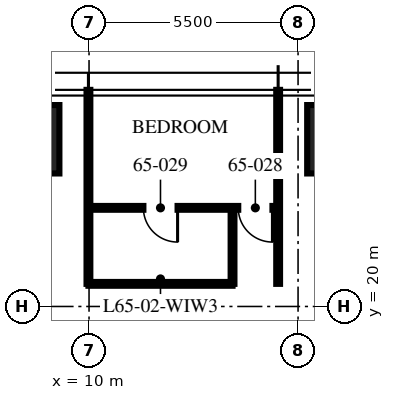
"""IFC4 building model, lengths in metres.
Left out: names, types, materials, properties, quantities, classifications, styles, units other than length and angle.
Written with IfcOpenShell. Run it as: python <this file> out.ifc"""

import sys

from ifc_helpers import new_model, si_unit, direction, frame, frame_2d, origin, origin_2d, place, context, subcontext, project, spatial, rectangle, extrude, element, fill, save


model = new_model("IFC4")
c1 = context("Model", 3, precision=1e-05, world=origin(), true_north=direction((0.0, 1.0)))
c2 = subcontext(c1, "Body", "Model", "MODEL_VIEW")
j1 = project(units=[si_unit("LENGTHUNIT", "METRE"), si_unit("PLANEANGLEUNIT", "RADIAN")], contexts=[c1])
p1 = place(None, origin())
s1 = spatial("IfcSite", under=j1, at=p1, CompositionType="ELEMENT")
p2 = place(p1, origin())
s2 = spatial("IfcBuilding", under=s1, at=p2, CompositionType="ELEMENT")
p3 = place(p2, frame((0.0, 0.0, 259.5)))
s3 = spatial("IfcBuildingStorey", under=s2, at=p3, CompositionType="ELEMENT", Elevation=259.5)
for number, where, z_axis, x_axis in (
    (1, (8.32, 24.4, 0.0), (0.0, 0.0, 1.0), (1.0, 0.0, 0.0)),
    (2, (16.64, 24.4, 0.0), (0.0, 0.0, 1.0), (1.0, 0.0, 0.0)),
):
    element("IfcColumn", number, at=place(p3, frame(where, z_axis=z_axis, x_axis=x_axis)), inside=s3, PredefinedType="COLUMN", context=c2, shape_type="SweptSolid", body=[
        extrude(rectangle(XDim=1.8, YDim=1.8, at=origin_2d()), origin(), (0.0, 0.0, 1.0), 3.75),
    ])
for number, where, z_axis, x_axis in (
    (3, (14.976, 20.595, 0.0), (0.0, 0.0, 1.0), (0.0, 1.0, 0.0)),
    (4, (9.984, 20.595, 0.0), (0.0, 0.0, 1.0), (0.0, 1.0, 0.0)),
):
    element("IfcWall", number, at=place(p3, frame(where, z_axis=z_axis, x_axis=x_axis)), inside=s3, PredefinedType="PARTITIONING", context=c2, shape_type="SweptSolid", body=[
        extrude(rectangle(XDim=5.105, YDim=0.1, at=frame_2d((2.552, 0.0))), origin(), (0.0, 0.0, 1.0), 2.91),
    ])
p4 = place(p3, frame((14.976, 22.595, 0.0), z_axis=(0.0, 0.0, 1.0), x_axis=(-1.0, 0.0, 0.0)))
e5 = element("IfcWall", 5, at=p4, inside=s3, PredefinedType="PARTITIONING", context=c2, shape_type="SweptSolid", body=[
    extrude(rectangle(XDim=4.992, YDim=0.1, at=frame_2d((2.496, 0.0))), origin(), (0.0, 0.0, 1.0), 2.81),
])
p5 = place(p4, frame((0.15, 0.0, 0.0)))
e6 = element("IfcOpeningElement", 6, at=p5, cuts=e5, PredefinedType="OPENING", context=c2, shape_type="SweptSolid", body=[
    extrude(rectangle(XDim=0.9, YDim=2.1, at=frame_2d((0.45, 1.05))), frame((0.0, 0.06, 0.0), z_axis=(0.0, -1.0, 0.0), x_axis=(1.0, 0.0, 0.0)), (0.0, 0.0, 1.0), 0.12),
])
p6 = place(p4, frame((2.646, 0.0, 0.0)))
e7 = element("IfcOpeningElement", 7, at=p6, cuts=e5, PredefinedType="OPENING", context=c2, shape_type="SweptSolid", body=[
    extrude(rectangle(XDim=0.9, YDim=2.1, at=frame_2d((0.45, 1.05))), frame((0.0, 0.06, 0.0), z_axis=(0.0, -1.0, 0.0), x_axis=(1.0, 0.0, 0.0)), (0.0, 0.0, 1.0), 0.12),
])
p7 = place(p3, frame((13.776, 20.595, 0.0), z_axis=(0.0, 0.0, 1.0), x_axis=(0.0, 1.0, 0.0)))
e8 = element("IfcWall", 8, at=p7, inside=s3, PredefinedType="PARTITIONING", context=c2, shape_type="SweptSolid", body=[
    extrude(rectangle(XDim=2.0, YDim=0.1, at=frame_2d((1.0, 0.0))), origin(), (0.0, 0.0, 1.0), 3.5),
])
p8 = place(p3, frame((13.776, 20.595, 0.0), z_axis=(0.0, 0.0, 1.0), x_axis=(-1.0, 0.0, 0.0)))
e9 = element("IfcWall", 9, at=p8, inside=s3, PredefinedType="PARTITIONING", context=c2, shape_type="SweptSolid", body=[
    extrude(rectangle(XDim=3.792, YDim=0.1, at=frame_2d((1.896, 0.0))), origin(), (0.0, 0.0, 1.0), 2.81),
])
p9 = place(p5, origin())
e10 = element("IfcDoor", 10, at=p9, inside=s3, OperationType="SINGLE_SWING_LEFT", PredefinedType="DOOR", context=c2, shape_type="SweptSolid", body=[
    extrude(rectangle(XDim=0.9, YDim=2.1, at=frame_2d((0.45, 1.05))), frame((0.0, 0.025, 0.0), z_axis=(0.0, -1.0, 0.0), x_axis=(1.0, 0.0, 0.0)), (0.0, 0.0, 1.0), 0.05),
])
fill(e6, e10)
p10 = place(p6, origin())
e11 = element("IfcDoor", 11, at=p10, inside=s3, OperationType="SINGLE_SWING_LEFT", PredefinedType="DOOR", context=c2, shape_type="SweptSolid", body=[
    extrude(rectangle(XDim=0.9, YDim=2.1, at=frame_2d((0.45, 1.05))), frame((0.0, 0.025, 0.0), z_axis=(0.0, -1.0, 0.0), x_axis=(1.0, 0.0, 0.0)), (0.0, 0.0, 1.0), 0.05),
])
fill(e7, e11)
save(model, sys.argv[1])
